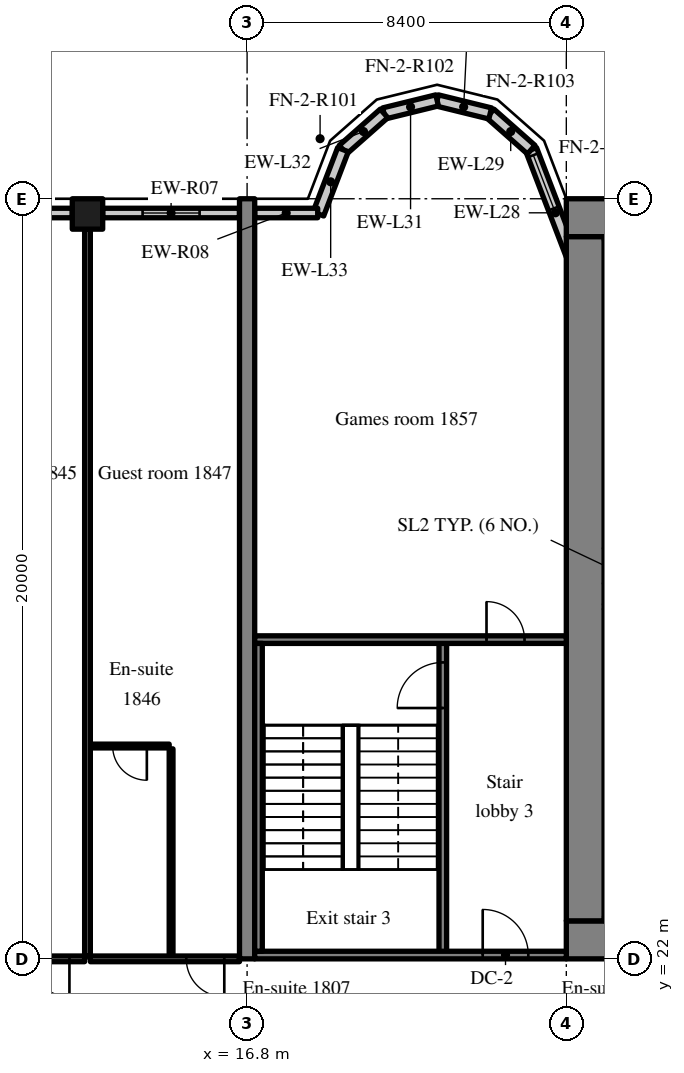
"""IFC4 building model, lengths in metres.
Left out: names, types, materials, properties, quantities, classifications, styles, units other than length and angle.
Written with IfcOpenShell. Run it as: python <this file> out.ifc"""

import sys

from ifc_helpers import new_model, si_unit, direction, frame, frame_2d, origin, origin_2d, place, context, subcontext, project, spatial, rectangle, extrude, source, transform, mapped, element, fill, save


model = new_model("IFC4")
c1 = context("Model", 3, precision=1e-05, world=origin(), true_north=direction((0.0, 1.0)))
c2 = subcontext(c1, "Body", "Model", "MODEL_VIEW")
j1 = project(units=[si_unit("LENGTHUNIT", "METRE"), si_unit("PLANEANGLEUNIT", "RADIAN")], contexts=[c1])
p1 = place(None, origin())
s1 = spatial("IfcSite", under=j1, at=p1, CompositionType="ELEMENT")
p2 = place(p1, origin())
s2 = spatial("IfcBuilding", under=s1, at=p2, CompositionType="ELEMENT")
p3 = place(p2, frame((0.0, 0.0, 77.2)))
s3 = spatial("IfcBuildingStorey", under=s2, at=p3, CompositionType="ELEMENT", Elevation=77.2)
m1 = source(origin(), c2, "Body", "SweptSolid", [
    extrude(rectangle(XDim=50.4, YDim=1.0, at=frame_2d((25.2, 0.0))), origin(), (0.0, 0.0, 1.0), 3.52),
])
p4 = place(p3, frame((25.2, 22.5, 0.0), z_axis=(0.0, 0.0, 1.0), x_axis=(1.0, 0.0, 0.0)))
e1 = element("IfcWall", 1, at=p4, inside=s3, PredefinedType="SHEAR", context=c2, shape_type="MappedRepresentation", body=[
    mapped(m1, transform((0.0, 0.0, 0.0), scale=1.0)),
])
m2 = source(origin(), c2, "Body", "SweptSolid", [
    extrude(rectangle(XDim=1.8, YDim=2.1, at=frame_2d((0.9, 1.05))), frame((0.0, 0.51, 0.0), z_axis=(0.0, -1.0, 0.0), x_axis=(1.0, 0.0, 0.0)), (0.0, 0.0, 1.0), 1.02),
])
p5 = place(p4, frame((15.9, 0.0, 0.0)))
e2 = element("IfcOpeningElement", 2, at=p5, cuts=e1, PredefinedType="OPENING", context=c2, shape_type="MappedRepresentation", body=[
    mapped(m2, transform((0.0, 0.0, 0.0), scale=1.0)),
])
m3 = source(origin(), c2, "Body", "SweptSolid", [
    extrude(rectangle(XDim=1.2, YDim=2.1, at=frame_2d((0.6, 1.05))), frame((0.0, 0.51, 0.0), z_axis=(0.0, -1.0, 0.0), x_axis=(1.0, 0.0, 0.0)), (0.0, 0.0, 1.0), 1.02),
])
p6 = place(p4, frame((26.987, 0.0, 0.0)))
e3 = element("IfcOpeningElement", 3, at=p6, cuts=e1, PredefinedType="OPENING", context=c2, shape_type="MappedRepresentation", body=[
    mapped(m3, transform((0.0, 0.0, 0.0), scale=1.0)),
])
m4 = source(origin(), c2, "Body", "SweptSolid", [
    extrude(rectangle(XDim=0.9, YDim=2.1, at=frame_2d((0.45, 1.05))), frame((0.0, 0.51, 0.0), z_axis=(0.0, -1.0, 0.0), x_axis=(1.0, 0.0, 0.0)), (0.0, 0.0, 1.0), 1.02),
])
p7 = place(p4, frame((32.25, 0.0, 0.0)))
e4 = element("IfcOpeningElement", 4, at=p7, cuts=e1, PredefinedType="OPENING", context=c2, shape_type="MappedRepresentation", body=[
    mapped(m4, transform((0.0, 0.0, 0.0), scale=1.0)),
])
p8 = place(p4, frame((38.262, 0.0, 0.0)))
e5 = element("IfcOpeningElement", 5, at=p8, cuts=e1, PredefinedType="OPENING", context=c2, shape_type="MappedRepresentation", body=[
    mapped(m4, transform((0.0, 0.0, 0.0), scale=1.0)),
])
p9 = place(p4, frame((6.438, 0.0, 0.0)))
e6 = element("IfcOpeningElement", 6, at=p9, cuts=e1, PredefinedType="OPENING", context=c2, shape_type="MappedRepresentation", body=[
    mapped(m3, transform((0.0, 0.0, 0.0), scale=1.0)),
])
p10 = place(p4, frame((47.725, 0.0, 0.0)))
e7 = element("IfcOpeningElement", 7, at=p10, cuts=e1, PredefinedType="OPENING", context=c2, shape_type="MappedRepresentation", body=[
    mapped(m3, transform((0.0, 0.0, 0.0), scale=1.0)),
])
p11 = place(p3, frame((25.2, 41.5, 0.0), z_axis=(0.0, 0.0, 1.0), x_axis=(1.0, 0.0, 0.0)))
e8 = element("IfcWall", 8, at=p11, inside=s3, PredefinedType="SHEAR", context=c2, shape_type="MappedRepresentation", body=[
    mapped(m1, transform((0.0, 0.0, 0.0), scale=1.0)),
])
m5 = source(origin(), c2, "Body", "SweptSolid", [
    extrude(rectangle(XDim=18.0, YDim=1.0, at=frame_2d((9.0, 0.0))), origin(), (0.0, 0.0, 1.0), 3.52),
])
p12 = place(p3, frame((25.7, 23.0, 0.0), z_axis=(0.0, 0.0, 1.0), x_axis=(0.0, 1.0, 0.0)))
e9 = element("IfcWall", 9, at=p12, inside=s3, PredefinedType="SHEAR", context=c2, shape_type="MappedRepresentation", body=[
    mapped(m5, transform((0.0, 0.0, 0.0), scale=1.0)),
])
m6 = source(origin(), c2, "Body", "SweptSolid", [
    extrude(rectangle(XDim=20.0, YDim=0.4, at=frame_2d((10.0, 0.0))), origin(), (0.0, 0.0, 1.0), 3.52),
])
p13 = place(p3, frame((16.8, 22.0, 0.0), z_axis=(0.0, 0.0, 1.0), x_axis=(0.0, 1.0, 0.0)))
e10 = element("IfcWall", 10, at=p13, inside=s3, PredefinedType="SHEAR", context=c2, shape_type="MappedRepresentation", body=[
    mapped(m6, transform((0.0, 0.0, 0.0), scale=1.0)),
])
m7 = source(origin(), c2, "Body", "SweptSolid", [
    extrude(rectangle(XDim=0.8, YDim=0.8, at=origin_2d()), origin(), (0.0, 0.0, 1.0), 3.52),
])
p14 = place(p3, frame((12.6, 41.6, 0.0), z_axis=(0.0, 0.0, 1.0), x_axis=(1.0, 0.0, 0.0)))
e11 = element("IfcColumn", 11, at=p14, inside=s3, PredefinedType="COLUMN", context=c2, shape_type="MappedRepresentation", body=[
    mapped(m7, transform((0.0, 0.0, 0.0), scale=1.0)),
])
m8 = source(origin(), c2, "Body", "SweptSolid", [
    extrude(rectangle(XDim=3.559, YDim=0.3, at=frame_2d((1.78, 0.0))), origin(), (0.0, 0.0, 1.0), 3.52),
])
p15 = place(p3, frame((25.55, 39.969, 0.0), z_axis=(0.0, 0.0, 1.0), x_axis=(-0.35779745313, 0.933799219604, 0.0)))
e12 = element("IfcWall", 12, at=p15, inside=s3, PredefinedType="SOLIDWALL", context=c2, shape_type="MappedRepresentation", body=[
    mapped(m8, transform((0.0, 0.0, 0.0), scale=1.0)),
])
m9 = source(origin(), c2, "Body", "SweptSolid", [
    extrude(rectangle(XDim=1.5, YDim=2.0, at=frame_2d((0.75, 1.0))), frame((0.0, 0.16, 0.0), z_axis=(0.0, -1.0, 0.0), x_axis=(1.0, 0.0, 0.0)), (0.0, 0.0, 1.0), 0.32),
])
p16 = place(p15, frame((1.903, 0.0, 0.9)))
e13 = element("IfcOpeningElement", 13, at=p16, cuts=e12, PredefinedType="OPENING", context=c2, shape_type="MappedRepresentation", body=[
    mapped(m9, transform((0.0, 0.0, 0.0), scale=1.0)),
])
m10 = source(origin(), c2, "Body", "SweptSolid", [
    extrude(rectangle(XDim=1.44, YDim=0.3, at=frame_2d((0.72, 0.0))), origin(), (0.0, 0.0, 1.0), 3.52),
])
p17 = place(p3, frame((24.277, 43.292, 0.0), z_axis=(0.0, 0.0, 1.0), x_axis=(-0.749649827867, 0.661834673902, 0.0)))
e14 = element("IfcWall", 14, at=p17, inside=s3, PredefinedType="SOLIDWALL", context=c2, shape_type="MappedRepresentation", body=[
    mapped(m10, transform((0.0, 0.0, 0.0), scale=1.0)),
])
m11 = source(origin(), c2, "Body", "SweptSolid", [
    extrude(rectangle(XDim=1.438, YDim=0.3, at=frame_2d((0.719, 0.0))), origin(), (0.0, 0.0, 1.0), 3.52),
])
p18 = place(p3, frame((23.197, 44.245, 0.0), z_axis=(0.0, 0.0, 1.0), x_axis=(-0.971152283879, 0.238460146601, 0.0)))
e15 = element("IfcWall", 15, at=p18, inside=s3, PredefinedType="SOLIDWALL", context=c2, shape_type="MappedRepresentation", body=[
    mapped(m11, transform((0.0, 0.0, 0.0), scale=1.0)),
])
m12 = source(origin(), c2, "Body", "SweptSolid", [
    extrude(rectangle(XDim=1.439, YDim=0.3, at=frame_2d((0.719, 0.0))), origin(), (0.0, 0.0, 1.0), 3.52),
])
p19 = place(p3, frame((21.8, 44.588, 0.0), z_axis=(0.0, 0.0, 1.0), x_axis=(-0.971161932466, -0.238420848351, 0.0)))
e16 = element("IfcWall", 16, at=p19, inside=s3, PredefinedType="SOLIDWALL", context=c2, shape_type="MappedRepresentation", body=[
    mapped(m12, transform((0.0, 0.0, 0.0), scale=1.0)),
])
m13 = source(origin(), c2, "Body", "SweptSolid", [
    extrude(rectangle(XDim=1.44, YDim=0.3, at=frame_2d((0.72, 0.0))), origin(), (0.0, 0.0, 1.0), 3.52),
])
p20 = place(p3, frame((20.403, 44.245, 0.0), z_axis=(0.0, 0.0, 1.0), x_axis=(-0.74957555648, -0.661918790432, 0.0)))
e17 = element("IfcWall", 17, at=p20, inside=s3, PredefinedType="SOLIDWALL", context=c2, shape_type="MappedRepresentation", body=[
    mapped(m13, transform((0.0, 0.0, 0.0), scale=1.0)),
])
m14 = source(origin(), c2, "Body", "SweptSolid", [
    extrude(rectangle(XDim=1.812, YDim=0.3, at=frame_2d((0.906, 0.0))), origin(), (0.0, 0.0, 1.0), 3.52),
])
p21 = place(p3, frame((19.323, 43.292, 0.0), z_axis=(0.0, 0.0, 1.0), x_axis=(-0.357877270961, -0.93376863244, 0.0)))
e18 = element("IfcWall", 18, at=p21, inside=s3, PredefinedType="SOLIDWALL", context=c2, shape_type="MappedRepresentation", body=[
    mapped(m14, transform((0.0, 0.0, 0.0), scale=1.0)),
])
m15 = source(origin(), c2, "Body", "SweptSolid", [
    extrude(rectangle(XDim=3.6, YDim=0.25, at=frame_2d((1.8, 0.0))), origin(), (0.0, 0.0, 1.0), 2.82),
])
p22 = place(p3, frame((12.2, 41.625, 0.0), z_axis=(0.0, 0.0, 1.0), x_axis=(-1.0, 0.0, 0.0)))
e19 = element("IfcWall", 19, at=p22, inside=s3, PredefinedType="SOLIDWALL", context=c2, shape_type="MappedRepresentation", body=[
    mapped(m15, transform((0.0, 0.0, 0.0), scale=1.0)),
])
m16 = source(origin(), c2, "Body", "SweptSolid", [
    extrude(rectangle(XDim=1.5, YDim=1.5, at=frame_2d((0.75, 0.75))), frame((0.0, 0.135, 0.0), z_axis=(0.0, -1.0, 0.0), x_axis=(1.0, 0.0, 0.0)), (0.0, 0.0, 1.0), 0.27),
])
p23 = place(p22, frame((1.05, 0.0, 0.9)))
e20 = element("IfcOpeningElement", 20, at=p23, cuts=e19, PredefinedType="OPENING", context=c2, shape_type="MappedRepresentation", body=[
    mapped(m16, transform((0.0, 0.0, 0.0), scale=1.0)),
])
m17 = source(origin(), c2, "Body", "SweptSolid", [
    extrude(rectangle(XDim=3.6, YDim=0.25, at=frame_2d((1.8, 0.0))), origin(), (0.0, 0.0, 1.0), 2.82),
])
p24 = place(p3, frame((16.6, 41.625, 0.0), z_axis=(0.0, 0.0, 1.0), x_axis=(-1.0, 0.0, 0.0)))
e21 = element("IfcWall", 21, at=p24, inside=s3, PredefinedType="SOLIDWALL", context=c2, shape_type="MappedRepresentation", body=[
    mapped(m17, transform((0.0, 0.0, 0.0), scale=1.0)),
])
p25 = place(p24, frame((1.05, 0.0, 0.9)))
e22 = element("IfcOpeningElement", 22, at=p25, cuts=e21, PredefinedType="OPENING", context=c2, shape_type="MappedRepresentation", body=[
    mapped(m16, transform((0.0, 0.0, 0.0), scale=1.0)),
])
m18 = source(origin(), c2, "Body", "SweptSolid", [
    extrude(rectangle(XDim=1.658, YDim=0.25, at=frame_2d((0.829, 0.0))), origin(), (0.0, 0.0, 1.0), 2.82),
])
p26 = place(p3, frame((18.658, 41.625, 0.0), z_axis=(0.0, 0.0, 1.0), x_axis=(-1.0, 0.0, 0.0)))
e23 = element("IfcWall", 23, at=p26, inside=s3, PredefinedType="SOLIDWALL", context=c2, shape_type="MappedRepresentation", body=[
    mapped(m18, transform((0.0, 0.0, 0.0), scale=1.0)),
])
m19 = source(origin(), c2, "Body", "SweptSolid", [
    extrude(rectangle(XDim=8.3, YDim=0.2, at=frame_2d((4.15, 0.0))), origin(), (0.0, 0.0, 1.0), 3.52),
])
p27 = place(p3, frame((21.95, 22.1, 0.0), z_axis=(0.0, 0.0, 1.0), x_axis=(0.0, 1.0, 0.0)))
e24 = element("IfcWall", 24, at=p27, inside=s3, PredefinedType="SOLIDWALL", context=c2, shape_type="MappedRepresentation", body=[
    mapped(m19, transform((0.0, 0.0, 0.0), scale=1.0)),
])
m20 = source(origin(), c2, "Body", "SweptSolid", [
    extrude(rectangle(XDim=1.2, YDim=2.1, at=frame_2d((0.6, 1.05))), frame((0.0, 0.11, 0.0), z_axis=(0.0, -1.0, 0.0), x_axis=(1.0, 0.0, 0.0)), (0.0, 0.0, 1.0), 0.22),
])
p28 = place(p27, frame((6.5, 0.0, 0.0)))
e25 = element("IfcOpeningElement", 25, at=p28, cuts=e24, PredefinedType="OPENING", context=c2, shape_type="MappedRepresentation", body=[
    mapped(m20, transform((0.0, 0.0, 0.0), scale=1.0)),
])
m21 = source(origin(), c2, "Body", "SweptSolid", [
    extrude(rectangle(XDim=8.2, YDim=0.2, at=frame_2d((4.1, 0.0))), origin(), (0.0, 0.0, 1.0), 3.52),
])
p29 = place(p3, frame((17.0, 22.1, 0.0), z_axis=(0.0, 0.0, 1.0), x_axis=(1.0, 0.0, 0.0)))
e26 = element("IfcWall", 26, at=p29, inside=s3, PredefinedType="SOLIDWALL", context=c2, shape_type="MappedRepresentation", body=[
    mapped(m21, transform((0.0, 0.0, 0.0), scale=1.0)),
])
p30 = place(p29, frame((6.0, 0.0, 0.0)))
e27 = element("IfcOpeningElement", 27, at=p30, cuts=e26, PredefinedType="OPENING", context=c2, shape_type="MappedRepresentation", body=[
    mapped(m20, transform((0.0, 0.0, 0.0), scale=1.0)),
])
p31 = place(p3, frame((17.0, 30.4, 0.0), z_axis=(0.0, 0.0, 1.0), x_axis=(1.0, 0.0, 0.0)))
e28 = element("IfcWall", 28, at=p31, inside=s3, PredefinedType="SOLIDWALL", context=c2, shape_type="MappedRepresentation", body=[
    mapped(m21, transform((0.0, 0.0, 0.0), scale=1.0)),
])
m22 = source(origin(), c2, "Body", "SweptSolid", [
    extrude(rectangle(XDim=1.0, YDim=2.1, at=frame_2d((0.5, 1.05))), frame((0.0, 0.11, 0.0), z_axis=(0.0, -1.0, 0.0), x_axis=(1.0, 0.0, 0.0)), (0.0, 0.0, 1.0), 0.22),
])
p32 = place(p31, frame((6.1, 0.0, 0.0)))
e29 = element("IfcOpeningElement", 29, at=p32, cuts=e28, PredefinedType="OPENING", context=c2, shape_type="MappedRepresentation", body=[
    mapped(m22, transform((0.0, 0.0, 0.0), scale=1.0)),
])
m23 = source(origin(), c2, "Body", "SweptSolid", [
    extrude(rectangle(XDim=8.1, YDim=0.2, at=frame_2d((4.05, 0.0))), origin(), (0.0, 0.0, 1.0), 3.52),
])
p33 = place(p3, frame((17.1, 22.2, 0.0), z_axis=(0.0, 0.0, 1.0), x_axis=(0.0, 1.0, 0.0)))
e30 = element("IfcWall", 30, at=p33, inside=s3, PredefinedType="SOLIDWALL", context=c2, shape_type="MappedRepresentation", body=[
    mapped(m23, transform((0.0, 0.0, 0.0), scale=1.0)),
])
m24 = source(origin(), c2, "Body", "SweptSolid", [
    extrude(rectangle(XDim=3.925, YDim=0.15, at=frame_2d((1.962, 0.0))), origin(), (0.0, 0.0, 1.0), 2.82),
])
p34 = place(p3, frame((8.6, 22.0, 0.0), z_axis=(0.0, 0.0, 1.0), x_axis=(1.0, 0.0, 0.0)))
e31 = element("IfcWall", 31, at=p34, inside=s3, PredefinedType="PARTITIONING", context=c2, shape_type="MappedRepresentation", body=[
    mapped(m24, transform((0.0, 0.0, 0.0), scale=1.0)),
])
m25 = source(origin(), c2, "Body", "SweptSolid", [
    extrude(rectangle(XDim=1.0, YDim=2.1, at=frame_2d((0.5, 1.05))), frame((0.0, 0.085, 0.0), z_axis=(0.0, -1.0, 0.0), x_axis=(1.0, 0.0, 0.0)), (0.0, 0.0, 1.0), 0.17),
])
p35 = place(p34, frame((2.525, 0.0, 0.0)))
e32 = element("IfcOpeningElement", 32, at=p35, cuts=e31, PredefinedType="OPENING", context=c2, shape_type="MappedRepresentation", body=[
    mapped(m25, transform((0.0, 0.0, 0.0), scale=1.0)),
])
m26 = source(origin(), c2, "Body", "SweptSolid", [
    extrude(rectangle(XDim=5.45, YDim=0.1, at=frame_2d((2.725, 0.0))), origin(), (0.0, 0.0, 1.0), 3.52),
])
p36 = place(p3, frame((14.8, 22.075, 0.0), z_axis=(0.0, 0.0, 1.0), x_axis=(0.0, 1.0, 0.0)))
e33 = element("IfcWall", 33, at=p36, inside=s3, PredefinedType="PARTITIONING", context=c2, shape_type="MappedRepresentation", body=[
    mapped(m26, transform((0.0, 0.0, 0.0), scale=1.0)),
])
m27 = source(origin(), c2, "Body", "SweptSolid", [
    extrude(rectangle(XDim=2.075, YDim=0.1, at=frame_2d((1.038, 0.0))), origin(), (0.0, 0.0, 1.0), 3.52),
])
p37 = place(p3, frame((12.675, 27.6, 0.0), z_axis=(0.0, 0.0, 1.0), x_axis=(1.0, 0.0, 0.0)))
e34 = element("IfcWall", 34, at=p37, inside=s3, PredefinedType="PARTITIONING", context=c2, shape_type="MappedRepresentation", body=[
    mapped(m27, transform((0.0, 0.0, 0.0), scale=1.0)),
])
m28 = source(origin(), c2, "Body", "SweptSolid", [
    extrude(rectangle(XDim=0.9, YDim=2.1, at=frame_2d((0.45, 1.05))), frame((0.0, 0.06, 0.0), z_axis=(0.0, -1.0, 0.0), x_axis=(1.0, 0.0, 0.0)), (0.0, 0.0, 1.0), 0.12),
])
p38 = place(p37, frame((0.587, 0.0, 0.0)))
e35 = element("IfcOpeningElement", 35, at=p38, cuts=e34, PredefinedType="OPENING", context=c2, shape_type="MappedRepresentation", body=[
    mapped(m28, transform((0.0, 0.0, 0.0), scale=1.0)),
])
m29 = source(origin(), c2, "Body", "SweptSolid", [
    extrude(rectangle(XDim=3.925, YDim=0.15, at=frame_2d((1.962, 0.0))), origin(), (0.0, 0.0, 1.0), 2.82),
])
p39 = place(p3, frame((12.675, 22.0, 0.0), z_axis=(0.0, 0.0, 1.0), x_axis=(1.0, 0.0, 0.0)))
e36 = element("IfcWall", 36, at=p39, inside=s3, PredefinedType="PARTITIONING", context=c2, shape_type="MappedRepresentation", body=[
    mapped(m29, transform((0.0, 0.0, 0.0), scale=1.0)),
])
p40 = place(p39, frame((2.525, 0.0, 0.0)))
e37 = element("IfcOpeningElement", 37, at=p40, cuts=e36, PredefinedType="OPENING", context=c2, shape_type="MappedRepresentation", body=[
    mapped(m25, transform((0.0, 0.0, 0.0), scale=1.0)),
])
m30 = source(origin(), c2, "Body", "SweptSolid", [
    extrude(rectangle(XDim=19.125, YDim=0.15, at=frame_2d((9.562, 0.0))), origin(), (0.0, 0.0, 1.0), 3.52),
])
p41 = place(p3, frame((12.6, 22.075, 0.0), z_axis=(0.0, 0.0, 1.0), x_axis=(0.0, 1.0, 0.0)))
e38 = element("IfcWall", 38, at=p41, inside=s3, PredefinedType="PARTITIONING", context=c2, shape_type="MappedRepresentation", body=[
    mapped(m30, transform((0.0, 0.0, 0.0), scale=1.0)),
])
m31 = source(origin(), c2, "Body", "SweptSolid", [
    extrude(rectangle(XDim=1.5, YDim=2.0, at=frame_2d((0.75, 1.0))), frame((0.0, 0.03, 0.0), z_axis=(0.0, -1.0, 0.0), x_axis=(1.0, 0.0, 0.0)), (0.0, 0.0, 1.0), 0.06),
])
p42 = place(p16, origin())
e39 = element("IfcWindow", 39, at=p42, inside=s3, PartitioningType="SINGLE_PANEL", PredefinedType="WINDOW", context=c2, shape_type="MappedRepresentation", body=[
    mapped(m31, transform((0.0, 0.0, 0.0), scale=1.0)),
])
fill(e13, e39)
m32 = source(origin(), c2, "Body", "SweptSolid", [
    extrude(rectangle(XDim=1.5, YDim=1.5, at=frame_2d((0.75, 0.75))), frame((0.0, 0.03, 0.0), z_axis=(0.0, -1.0, 0.0), x_axis=(1.0, 0.0, 0.0)), (0.0, 0.0, 1.0), 0.06),
])
p43 = place(p25, origin())
e40 = element("IfcWindow", 40, at=p43, inside=s3, PartitioningType="SINGLE_PANEL", PredefinedType="WINDOW", context=c2, shape_type="MappedRepresentation", body=[
    mapped(m32, transform((0.0, 0.0, 0.0), scale=1.0)),
])
fill(e22, e40)
m33 = source(origin(), c2, "Body", "SweptSolid", [
    extrude(rectangle(XDim=1.2, YDim=2.1, at=frame_2d((0.6, 1.05))), frame((0.0, 0.025, 0.0), z_axis=(0.0, -1.0, 0.0), x_axis=(1.0, 0.0, 0.0)), (0.0, 0.0, 1.0), 0.05),
])
p44 = place(p28, origin())
e41 = element("IfcDoor", 41, at=p44, inside=s3, OperationType="SINGLE_SWING_LEFT", PredefinedType="DOOR", context=c2, shape_type="MappedRepresentation", body=[
    mapped(m33, transform((0.0, 0.0, 0.0), scale=1.0)),
])
fill(e25, e41)
p45 = place(p30, origin())
e42 = element("IfcDoor", 42, at=p45, inside=s3, OperationType="SINGLE_SWING_LEFT", PredefinedType="DOOR", context=c2, shape_type="MappedRepresentation", body=[
    mapped(m33, transform((0.0, 0.0, 0.0), scale=1.0)),
])
fill(e27, e42)
m34 = source(origin(), c2, "Body", "SweptSolid", [
    extrude(rectangle(XDim=1.0, YDim=2.1, at=frame_2d((0.5, 1.05))), frame((0.0, 0.025, 0.0), z_axis=(0.0, -1.0, 0.0), x_axis=(1.0, 0.0, 0.0)), (0.0, 0.0, 1.0), 0.05),
])
p46 = place(p32, origin())
e43 = element("IfcDoor", 43, at=p46, inside=s3, OperationType="SINGLE_SWING_LEFT", PredefinedType="DOOR", context=c2, shape_type="MappedRepresentation", body=[
    mapped(m34, transform((0.0, 0.0, 0.0), scale=1.0)),
])
fill(e29, e43)
p47 = place(p35, origin())
e44 = element("IfcDoor", 44, at=p47, inside=s3, OperationType="SINGLE_SWING_RIGHT", PredefinedType="DOOR", context=c2, shape_type="MappedRepresentation", body=[
    mapped(m34, transform((0.0, 0.0, 0.0), scale=1.0)),
])
fill(e32, e44)
m35 = source(origin(), c2, "Body", "SweptSolid", [
    extrude(rectangle(XDim=0.9, YDim=2.1, at=frame_2d((0.45, 1.05))), frame((0.0, 0.025, 0.0), z_axis=(0.0, -1.0, 0.0), x_axis=(1.0, 0.0, 0.0)), (0.0, 0.0, 1.0), 0.05),
])
p48 = place(p38, origin())
e45 = element("IfcDoor", 45, at=p48, inside=s3, OperationType="SINGLE_SWING_RIGHT", PredefinedType="DOOR", context=c2, shape_type="MappedRepresentation", body=[
    mapped(m35, transform((0.0, 0.0, 0.0), scale=1.0)),
])
fill(e35, e45)
p49 = place(p40, origin())
e46 = element("IfcDoor", 46, at=p49, inside=s3, OperationType="SINGLE_SWING_RIGHT", PredefinedType="DOOR", context=c2, shape_type="MappedRepresentation", body=[
    mapped(m34, transform((0.0, 0.0, 0.0), scale=1.0)),
])
fill(e37, e46)
save(model, sys.argv[1])
